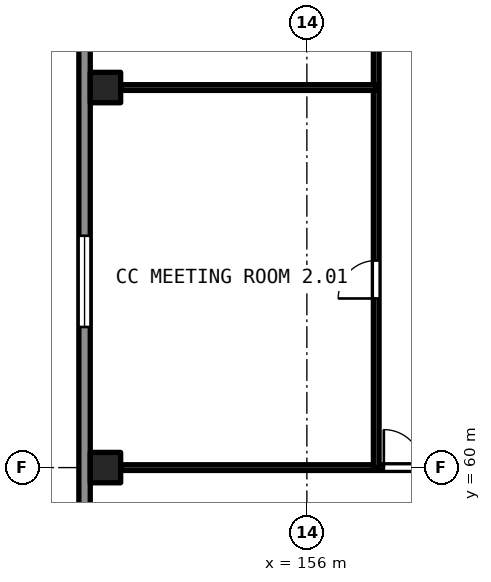
"""IFC4 building model, lengths in metres.
Left out: names, types, materials, properties, quantities, classifications, styles, units other than length and angle.
Written with IfcOpenShell. Run it as: python <this file> out.ifc"""

import sys

from ifc_helpers import new_model, si_unit, direction, frame, frame_2d, origin, origin_2d, place, context, subcontext, project, spatial, rectangle, extrude, element, fill, save


model = new_model("IFC4")
c1 = context("Model", 3, precision=1e-05, world=origin(), true_north=direction((0.0, 1.0)))
c2 = subcontext(c1, "Body", "Model", "MODEL_VIEW")
j1 = project(units=[si_unit("LENGTHUNIT", "METRE"), si_unit("PLANEANGLEUNIT", "RADIAN")], contexts=[c1])
p1 = place(None, origin())
s1 = spatial("IfcSite", under=j1, at=p1, CompositionType="ELEMENT")
p2 = place(p1, origin())
s2 = spatial("IfcBuilding", under=s1, at=p2, CompositionType="ELEMENT")
p3 = place(p2, frame((0.0, 0.0, 15.0)))
s3 = spatial("IfcBuildingStorey", under=s2, at=p3, CompositionType="ELEMENT", Elevation=15.0)
for number, where, z_axis, x_axis in (
    (1, (150.7, 60.0, 0.0), (0.0, 0.0, 1.0), (1.0, 0.0, 0.0)),
    (2, (150.7, 70.0, 0.0), (0.0, 0.0, 1.0), (1.0, 0.0, 0.0)),
):
    element("IfcColumn", number, at=place(p3, frame(where, z_axis=z_axis, x_axis=x_axis)), inside=s3, PredefinedType="COLUMN", context=c2, shape_type="SweptSolid", body=[
        extrude(rectangle(XDim=0.8, YDim=0.8, at=origin_2d()), origin(), (0.0, 0.0, 1.0), 5.4),
    ])
p4 = place(p3, frame((150.15, 49.45, 0.0), z_axis=(0.0, 0.0, 1.0), x_axis=(0.0, 1.0, 0.0)))
e3 = element("IfcWall", 3, at=p4, inside=s3, PredefinedType="SOLIDWALL", context=c2, shape_type="SweptSolid", body=[
    extrude(rectangle(XDim=50.55, YDim=0.3, at=frame_2d((25.275, 0.0))), origin(), (0.0, 0.0, 1.0), 4.99),
])
p5 = place(p4, frame((14.25, 0.0, 0.9)))
e4 = element("IfcOpeningElement", 4, at=p5, cuts=e3, PredefinedType="OPENING", context=c2, shape_type="SweptSolid", body=[
    extrude(rectangle(XDim=2.4, YDim=1.8, at=frame_2d((1.2, 0.9))), frame((0.0, 0.161, 0.0), z_axis=(0.0, -1.0, 0.0), x_axis=(1.0, 0.0, 0.0)), (0.0, 0.0, 1.0), 0.321),
])
p6 = place(p4, frame((24.25, 0.0, 0.9)))
e5 = element("IfcOpeningElement", 5, at=p6, cuts=e3, PredefinedType="OPENING", context=c2, shape_type="SweptSolid", body=[
    extrude(rectangle(XDim=2.4, YDim=1.8, at=frame_2d((1.2, 0.9))), frame((0.0, 0.161, 0.0), z_axis=(0.0, -1.0, 0.0), x_axis=(1.0, 0.0, 0.0)), (0.0, 0.0, 1.0), 0.321),
])
p7 = place(p4, frame((34.25, 0.0, 0.9)))
e6 = element("IfcOpeningElement", 6, at=p7, cuts=e3, PredefinedType="OPENING", context=c2, shape_type="SweptSolid", body=[
    extrude(rectangle(XDim=2.4, YDim=1.8, at=frame_2d((1.2, 0.9))), frame((0.0, 0.161, 0.0), z_axis=(0.0, -1.0, 0.0), x_axis=(1.0, 0.0, 0.0)), (0.0, 0.0, 1.0), 0.321),
])
p8 = place(p4, frame((44.25, 0.0, 0.9)))
e7 = element("IfcOpeningElement", 7, at=p8, cuts=e3, PredefinedType="OPENING", context=c2, shape_type="SweptSolid", body=[
    extrude(rectangle(XDim=2.4, YDim=1.8, at=frame_2d((1.2, 0.9))), frame((0.0, 0.161, 0.0), z_axis=(0.0, -1.0, 0.0), x_axis=(1.0, 0.0, 0.0)), (0.0, 0.0, 1.0), 0.321),
])
p9 = place(p3, frame((160.3, 60.0, 0.0), z_axis=(0.0, 0.0, 1.0), x_axis=(-1.0, 0.0, 0.0)))
e8 = element("IfcWall", 8, at=p9, inside=s3, PredefinedType="PARTITIONING", context=c2, shape_type="SweptSolid", body=[
    extrude(rectangle(XDim=9.2, YDim=0.15, at=frame_2d((4.6, 0.0))), origin(), (0.0, 0.0, 1.0), 4.99),
])
p10 = place(p9, frame((1.275, 0.0, 0.0)))
e9 = element("IfcOpeningElement", 9, at=p10, cuts=e8, PredefinedType="OPENING", context=c2, shape_type="SweptSolid", body=[
    extrude(rectangle(XDim=1.0, YDim=2.1, at=frame_2d((0.5, 1.05))), frame((0.0, 0.085, 0.0), z_axis=(0.0, -1.0, 0.0), x_axis=(1.0, 0.0, 0.0)), (0.0, 0.0, 1.0), 0.171),
])
p11 = place(p3, frame((157.825, 100.0, 0.0), z_axis=(0.0, 0.0, 1.0), x_axis=(0.0, -1.0, 0.0)))
e10 = element("IfcWall", 10, at=p11, inside=s3, PredefinedType="PARTITIONING", context=c2, shape_type="SweptSolid", body=[
    extrude(rectangle(XDim=40.0, YDim=0.15, at=frame_2d((20.0, 0.0))), origin(), (0.0, 0.0, 1.0), 4.99),
])
p12 = place(p11, frame((34.55, 0.0, 0.0)))
e11 = element("IfcOpeningElement", 11, at=p12, cuts=e10, PredefinedType="OPENING", context=c2, shape_type="SweptSolid", body=[
    extrude(rectangle(XDim=1.0, YDim=2.1, at=frame_2d((0.5, 1.05))), frame((0.0, 0.085, 0.0), z_axis=(0.0, -1.0, 0.0), x_axis=(1.0, 0.0, 0.0)), (0.0, 0.0, 1.0), 0.171),
])
p13 = place(p11, frame((24.55, 0.0, 0.0)))
e12 = element("IfcOpeningElement", 12, at=p13, cuts=e10, PredefinedType="OPENING", context=c2, shape_type="SweptSolid", body=[
    extrude(rectangle(XDim=1.0, YDim=2.1, at=frame_2d((0.5, 1.05))), frame((0.0, 0.085, 0.0), z_axis=(0.0, -1.0, 0.0), x_axis=(1.0, 0.0, 0.0)), (0.0, 0.0, 1.0), 0.171),
])
p14 = place(p11, frame((14.55, 0.0, 0.0)))
e13 = element("IfcOpeningElement", 13, at=p14, cuts=e10, PredefinedType="OPENING", context=c2, shape_type="SweptSolid", body=[
    extrude(rectangle(XDim=1.0, YDim=2.1, at=frame_2d((0.5, 1.05))), frame((0.0, 0.085, 0.0), z_axis=(0.0, -1.0, 0.0), x_axis=(1.0, 0.0, 0.0)), (0.0, 0.0, 1.0), 0.171),
])
p15 = place(p11, frame((4.55, 0.0, 0.0)))
e14 = element("IfcOpeningElement", 14, at=p15, cuts=e10, PredefinedType="OPENING", context=c2, shape_type="SweptSolid", body=[
    extrude(rectangle(XDim=1.0, YDim=2.1, at=frame_2d((0.5, 1.05))), frame((0.0, 0.085, 0.0), z_axis=(0.0, -1.0, 0.0), x_axis=(1.0, 0.0, 0.0)), (0.0, 0.0, 1.0), 0.171),
])
p16 = place(p3, frame((151.1, 70.0, 0.0), z_axis=(0.0, 0.0, 1.0), x_axis=(1.0, 0.0, 0.0)))
e15 = element("IfcWall", 15, at=p16, inside=s3, PredefinedType="PARTITIONING", context=c2, shape_type="SweptSolid", body=[
    extrude(rectangle(XDim=6.725, YDim=0.15, at=frame_2d((3.362, 0.0))), origin(), (0.0, 0.0, 1.0), 4.99),
])
p17 = place(p10, origin())
e16 = element("IfcDoor", 16, at=p17, inside=s3, OperationType="SINGLE_SWING_RIGHT", PredefinedType="DOOR", context=c2, shape_type="SweptSolid", body=[
    extrude(rectangle(XDim=1.0, YDim=2.1, at=frame_2d((0.5, 1.05))), frame((0.0, 0.025, 0.0), z_axis=(0.0, -1.0, 0.0), x_axis=(1.0, 0.0, 0.0)), (0.0, 0.0, 1.0), 0.05),
])
fill(e9, e16)
p18 = place(p12, origin())
e17 = element("IfcDoor", 17, at=p18, inside=s3, OperationType="SINGLE_SWING_RIGHT", PredefinedType="DOOR", context=c2, shape_type="SweptSolid", body=[
    extrude(rectangle(XDim=1.0, YDim=2.1, at=frame_2d((0.5, 1.05))), frame((0.0, 0.025, 0.0), z_axis=(0.0, -1.0, 0.0), x_axis=(1.0, 0.0, 0.0)), (0.0, 0.0, 1.0), 0.05),
])
fill(e11, e17)
p19 = place(p5, origin())
e18 = element("IfcWindow", 18, at=p19, inside=s3, PartitioningType="DOUBLE_PANEL_VERTICAL", PredefinedType="WINDOW", context=c2, shape_type="SweptSolid", body=[
    extrude(rectangle(XDim=2.4, YDim=1.8, at=frame_2d((1.2, 0.9))), frame((0.0, 0.03, 0.0), z_axis=(0.0, -1.0, 0.0), x_axis=(1.0, 0.0, 0.0)), (0.0, 0.0, 1.0), 0.06),
])
fill(e4, e18)
save(model, sys.argv[1])
